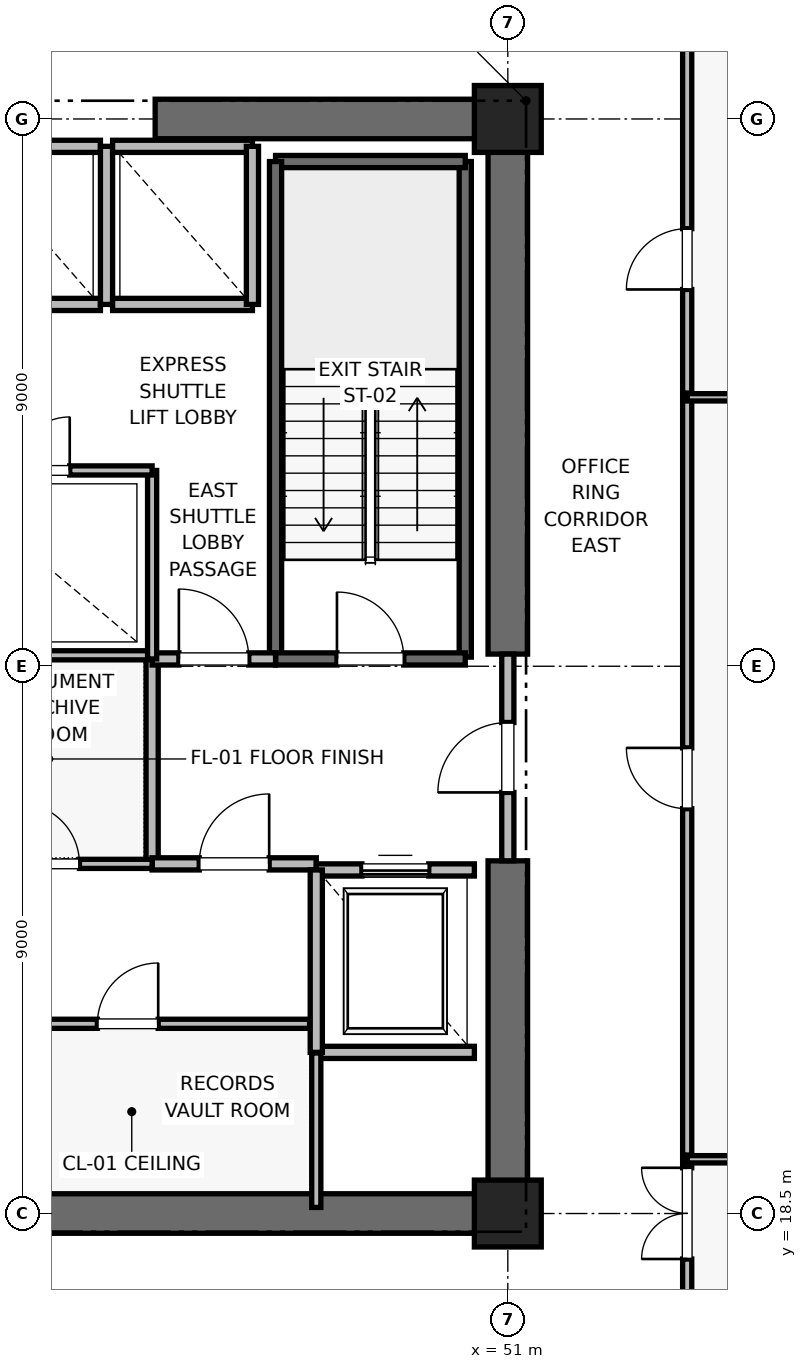
"""IFC4 building model, lengths in metres.
Left out: names, types, materials, properties, quantities, classifications, styles, units other than length and angle.
Written with IfcOpenShell. Run it as: python <this file> out.ifc"""

import sys

from ifc_helpers import new_model, si_unit, direction, frame, frame_2d, origin, origin_2d, place, context, subcontext, project, spatial, rectangle, extrude, element, fill, save


model = new_model("IFC4")
c1 = context("Model", 3, precision=1e-05, world=origin(), true_north=direction((0.0, 1.0)))
c2 = subcontext(c1, "Body", "Model", "MODEL_VIEW")
j1 = project(units=[si_unit("LENGTHUNIT", "METRE"), si_unit("PLANEANGLEUNIT", "RADIAN")], contexts=[c1])
p1 = place(None, origin())
s1 = spatial("IfcSite", under=j1, at=p1, CompositionType="ELEMENT")
p2 = place(p1, origin())
s2 = spatial("IfcBuilding", under=s1, at=p2, CompositionType="ELEMENT")
p3 = place(p2, frame((0.0, 0.0, 55.6)))
s3 = spatial("IfcBuildingStorey", under=s2, at=p3, CompositionType="ELEMENT", Elevation=55.6)
for number, where, z_axis, x_axis in (
    (1, (51.0, 18.5, 0.0), (0.0, 0.0, 1.0), (1.0, 0.0, 0.0)),
    (2, (51.0, 36.5, 0.0), (0.0, 0.0, 1.0), (1.0, 0.0, 0.0)),
):
    element("IfcColumn", number, at=place(p3, frame(where, z_axis=z_axis, x_axis=x_axis)), inside=s3, PredefinedType="PILASTER", context=c2, shape_type="SweptSolid", body=[
        extrude(rectangle(XDim=1.1, YDim=1.1, at=origin_2d()), origin(), (0.0, 0.0, 1.0), 4.0),
    ])
p4 = place(p3, frame((41.8, 18.5, 0.0), z_axis=(0.0, 0.0, 1.0), x_axis=(1.0, 0.0, 0.0)))
e3 = element("IfcWall", 3, at=p4, inside=s3, PredefinedType="SHEAR", context=c2, shape_type="SweptSolid", body=[
    extrude(rectangle(XDim=9.2, YDim=0.65, at=frame_2d((4.6, 0.0))), origin(), (0.0, 0.0, 1.0), 3.76),
])
for number, where, z_axis, x_axis in (
    (4, (45.2, 36.5, 0.0), (0.0, 0.0, 1.0), (1.0, 0.0, 0.0)),
    (5, (51.0, 18.5, 0.0), (0.0, 0.0, 1.0), (0.0, 1.0, 0.0)),
):
    element("IfcWall", number, at=place(p3, frame(where, z_axis=z_axis, x_axis=x_axis)), inside=s3, PredefinedType="SHEAR", context=c2, shape_type="SweptSolid", body=[
        extrude(rectangle(XDim=5.8, YDim=0.65, at=frame_2d((2.9, 0.0))), origin(), (0.0, 0.0, 1.0), 3.76),
    ])
p5 = place(p3, frame((51.0, 27.7, 0.0), z_axis=(0.0, 0.0, 1.0), x_axis=(0.0, 1.0, 0.0)))
e6 = element("IfcWall", 6, at=p5, inside=s3, PredefinedType="SHEAR", context=c2, shape_type="SweptSolid", body=[
    extrude(rectangle(XDim=8.8, YDim=0.65, at=frame_2d((4.4, 0.0))), origin(), (0.0, 0.0, 1.0), 3.76),
])
p6 = place(p3, frame((50.3, 27.65, 0.0), z_axis=(0.0, 0.0, 1.0), x_axis=(0.0, 1.0, 0.0)))
e7 = element("IfcWall", 7, at=p6, inside=s3, PredefinedType="SOLIDWALL", context=c2, shape_type="SweptSolid", body=[
    extrude(rectangle(XDim=8.15, YDim=0.2, at=frame_2d((4.075, 0.0))), origin(), (0.0, 0.0, 1.0), 3.76),
])
p7 = place(p3, frame((47.18, 35.8, 0.0), z_axis=(0.0, 0.0, 1.0), x_axis=(1.0, 0.0, 0.0)))
e8 = element("IfcWall", 8, at=p7, inside=s3, PredefinedType="SOLIDWALL", context=c2, shape_type="SweptSolid", body=[
    extrude(rectangle(XDim=3.12, YDim=0.2, at=frame_2d((1.56, 0.0))), origin(), (0.0, 0.0, 1.0), 3.76),
])
p8 = place(p3, frame((47.18, 27.62, 0.0), z_axis=(0.0, 0.0, 1.0), x_axis=(0.0, 1.0, 0.0)))
e9 = element("IfcWall", 9, at=p8, inside=s3, PredefinedType="SOLIDWALL", context=c2, shape_type="SweptSolid", body=[
    extrude(rectangle(XDim=8.18, YDim=0.2, at=frame_2d((4.09, 0.0))), origin(), (0.0, 0.0, 1.0), 3.76),
])
p9 = place(p3, frame((47.18, 27.62, 0.0), z_axis=(0.0, 0.0, 1.0), x_axis=(1.0, 0.0, 0.0)))
e10 = element("IfcWall", 10, at=p9, inside=s3, PredefinedType="SOLIDWALL", context=c2, shape_type="SweptSolid", body=[
    extrude(rectangle(XDim=3.12, YDim=0.2, at=frame_2d((1.56, 0.0))), origin(), (0.0, 0.0, 1.0), 3.76),
])
p10 = place(p9, frame((1.01, 0.0, 0.0)))
e11 = element("IfcOpeningElement", 11, at=p10, cuts=e10, PredefinedType="OPENING", context=c2, shape_type="SweptSolid", body=[
    extrude(rectangle(XDim=1.1, YDim=2.15, at=frame_2d((0.55, 1.075))), frame((0.0, 0.1, 0.0), z_axis=(0.0, -1.0, 0.0), x_axis=(1.0, 0.0, 0.0)), (0.0, 0.0, 1.0), 0.2),
])
p11 = place(p3, frame((45.15, 24.25, 0.0), z_axis=(0.0, 0.0, 1.0), x_axis=(0.0, 1.0, 0.0)))
e12 = element("IfcWall", 12, at=p11, inside=s3, PredefinedType="PARTITIONING", context=c2, shape_type="SweptSolid", body=[
    extrude(rectangle(XDim=3.37, YDim=0.2, at=frame_2d((1.685, 0.0))), origin(), (0.0, 0.0, 1.0), 3.76),
])
p12 = place(p3, frame((45.15, 24.25, 0.0), z_axis=(0.0, 0.0, 1.0), x_axis=(1.0, 0.0, 0.0)))
e13 = element("IfcWall", 13, at=p12, inside=s3, PredefinedType="PARTITIONING", context=c2, shape_type="SweptSolid", body=[
    extrude(rectangle(XDim=2.7, YDim=0.2, at=frame_2d((1.35, 0.0))), origin(), (0.0, 0.0, 1.0), 3.76),
])
p13 = place(p12, frame((0.775, 0.0, 0.0)))
e14 = element("IfcOpeningElement", 14, at=p13, cuts=e13, PredefinedType="OPENING", context=c2, shape_type="SweptSolid", body=[
    extrude(rectangle(XDim=1.15, YDim=2.2, at=frame_2d((0.575, 1.1))), frame((0.0, 0.1, 0.0), z_axis=(0.0, -1.0, 0.0), x_axis=(1.0, 0.0, 0.0)), (0.0, 0.0, 1.0), 0.2),
])
p14 = place(p3, frame((45.15, 27.62, 0.0), z_axis=(0.0, 0.0, 1.0), x_axis=(1.0, 0.0, 0.0)))
e15 = element("IfcWall", 15, at=p14, inside=s3, PredefinedType="PARTITIONING", context=c2, shape_type="SweptSolid", body=[
    extrude(rectangle(XDim=2.03, YDim=0.2, at=frame_2d((1.015, 0.0))), origin(), (0.0, 0.0, 1.0), 3.76),
])
p15 = place(p14, frame((0.44, 0.0, 0.0)))
e16 = element("IfcOpeningElement", 16, at=p15, cuts=e15, PredefinedType="OPENING", context=c2, shape_type="SweptSolid", body=[
    extrude(rectangle(XDim=1.15, YDim=2.2, at=frame_2d((0.575, 1.1))), frame((0.0, 0.1, 0.0), z_axis=(0.0, -1.0, 0.0), x_axis=(1.0, 0.0, 0.0)), (0.0, 0.0, 1.0), 0.2),
])
p16 = place(p3, frame((51.0, 24.3, 0.0), z_axis=(0.0, 0.0, 1.0), x_axis=(0.0, 1.0, 0.0)))
e17 = element("IfcWall", 17, at=p16, inside=s3, PredefinedType="PARTITIONING", context=c2, shape_type="SweptSolid", body=[
    extrude(rectangle(XDim=3.4, YDim=0.2, at=frame_2d((1.7, 0.0))), origin(), (0.0, 0.0, 1.0), 2.54),
])
p17 = place(p16, frame((1.125, 0.0, 0.0)))
e18 = element("IfcOpeningElement", 18, at=p17, cuts=e17, PredefinedType="OPENING", context=c2, shape_type="SweptSolid", body=[
    extrude(rectangle(XDim=1.15, YDim=2.2, at=frame_2d((0.575, 1.1))), frame((0.0, 0.1, 0.0), z_axis=(0.0, -1.0, 0.0), x_axis=(1.0, 0.0, 0.0)), (0.0, 0.0, 1.0), 0.2),
])
p18 = place(p3, frame((47.85, 21.15, 0.0), z_axis=(0.0, 0.0, 1.0), x_axis=(1.0, 0.0, 0.0)))
e19 = element("IfcWall", 19, at=p18, inside=s3, PredefinedType="SOLIDWALL", context=c2, shape_type="SweptSolid", body=[
    extrude(rectangle(XDim=2.6, YDim=0.2, at=frame_2d((1.3, 0.0))), origin(), (0.0, 0.0, 1.0), 3.76),
])
p19 = place(p3, frame((50.45, 24.15, 0.0), z_axis=(0.0, 0.0, 1.0), x_axis=(-1.0, 0.0, 0.0)))
e20 = element("IfcWall", 20, at=p19, inside=s3, PredefinedType="SOLIDWALL", context=c2, shape_type="SweptSolid", body=[
    extrude(rectangle(XDim=2.6, YDim=0.2, at=frame_2d((1.3, 0.0))), origin(), (0.0, 0.0, 1.0), 2.54),
])
p20 = place(p19, frame((0.75, 0.0, 0.0)))
e21 = element("IfcOpeningElement", 21, at=p20, cuts=e20, PredefinedType="OPENING", context=c2, shape_type="SweptSolid", body=[
    extrude(rectangle(XDim=1.1, YDim=2.2, at=frame_2d((0.55, 1.1))), frame((0.0, 0.1, 0.0), z_axis=(0.0, -1.0, 0.0), x_axis=(1.0, 0.0, 0.0)), (0.0, 0.0, 1.0), 0.2),
])
p21 = place(p3, frame((47.85, 24.15, 0.0), z_axis=(0.0, 0.0, 1.0), x_axis=(0.0, -1.0, 0.0)))
e22 = element("IfcWall", 22, at=p21, inside=s3, PredefinedType="SOLIDWALL", context=c2, shape_type="SweptSolid", body=[
    extrude(rectangle(XDim=3.0, YDim=0.2, at=frame_2d((1.5, 0.0))), origin(), (0.0, 0.0, 1.0), 3.76),
])
p22 = place(p3, frame((42.0, 33.45, 0.0), z_axis=(0.0, 0.0, 1.0), x_axis=(1.0, 0.0, 0.0)))
e23 = element("IfcWall", 23, at=p22, inside=s3, PredefinedType="SOLIDWALL", context=c2, shape_type="SweptSolid", body=[
    extrude(rectangle(XDim=2.3, YDim=0.2, at=frame_2d((1.15, 0.0))), origin(), (0.0, 0.0, 1.0), 3.76),
])
p23 = place(p3, frame((44.3, 36.05, 0.0), z_axis=(0.0, 0.0, 1.0), x_axis=(-1.0, 0.0, 0.0)))
e24 = element("IfcWall", 24, at=p23, inside=s3, PredefinedType="SOLIDWALL", context=c2, shape_type="SweptSolid", body=[
    extrude(rectangle(XDim=2.3, YDim=0.2, at=frame_2d((1.15, 0.0))), origin(), (0.0, 0.0, 1.0), 2.54),
])
p24 = place(p3, frame((44.4, 33.45, 0.0), z_axis=(0.0, 0.0, 1.0), x_axis=(0.0, 1.0, 0.0)))
e25 = element("IfcWall", 25, at=p24, inside=s3, PredefinedType="SOLIDWALL", context=c2, shape_type="SweptSolid", body=[
    extrude(rectangle(XDim=2.6, YDim=0.2, at=frame_2d((1.3, 0.0))), origin(), (0.0, 0.0, 1.0), 2.54),
])
p25 = place(p3, frame((44.5, 33.45, 0.0), z_axis=(0.0, 0.0, 1.0), x_axis=(1.0, 0.0, 0.0)))
e26 = element("IfcWall", 26, at=p25, inside=s3, PredefinedType="SOLIDWALL", context=c2, shape_type="SweptSolid", body=[
    extrude(rectangle(XDim=2.3, YDim=0.2, at=frame_2d((1.15, 0.0))), origin(), (0.0, 0.0, 1.0), 3.76),
])
p26 = place(p3, frame((46.8, 36.05, 0.0), z_axis=(0.0, 0.0, 1.0), x_axis=(-1.0, 0.0, 0.0)))
e27 = element("IfcWall", 27, at=p26, inside=s3, PredefinedType="SOLIDWALL", context=c2, shape_type="SweptSolid", body=[
    extrude(rectangle(XDim=2.3, YDim=0.2, at=frame_2d((1.15, 0.0))), origin(), (0.0, 0.0, 1.0), 2.54),
])
p27 = place(p3, frame((46.8, 33.45, 0.0), z_axis=(0.0, 0.0, 1.0), x_axis=(0.0, 1.0, 0.0)))
e28 = element("IfcWall", 28, at=p27, inside=s3, PredefinedType="SOLIDWALL", context=c2, shape_type="SweptSolid", body=[
    extrude(rectangle(XDim=2.6, YDim=0.2, at=frame_2d((1.3, 0.0))), origin(), (0.0, 0.0, 1.0), 3.76),
])
p28 = place(p3, frame((41.56, 27.68, 0.0), z_axis=(0.0, 0.0, 1.0), x_axis=(1.0, 0.0, 0.0)))
e29 = element("IfcWall", 29, at=p28, inside=s3, PredefinedType="PARTITIONING", context=c2, shape_type="SweptSolid", body=[
    extrude(rectangle(XDim=3.59, YDim=0.15, at=frame_2d((1.795, 0.0))), origin(), (0.0, 0.0, 1.0), 2.85),
])
p29 = place(p3, frame((47.85, 18.6, 0.0), z_axis=(0.0, 0.0, 1.0), x_axis=(0.0, 1.0, 0.0)))
e30 = element("IfcWall", 30, at=p29, inside=s3, PredefinedType="PARTITIONING", context=c2, shape_type="SweptSolid", body=[
    extrude(rectangle(XDim=2.54, YDim=0.15, at=frame_2d((1.27, 0.0))), origin(), (0.0, 0.0, 1.0), 2.85),
])
p30 = place(p3, frame((41.76, 21.62, 0.0), z_axis=(0.0, 0.0, 1.0), x_axis=(1.0, 0.0, 0.0)))
e31 = element("IfcWall", 31, at=p30, inside=s3, PredefinedType="PARTITIONING", context=c2, shape_type="SweptSolid", body=[
    extrude(rectangle(XDim=5.98, YDim=0.15, at=frame_2d((2.99, 0.0))), origin(), (0.0, 0.0, 1.0), 2.85),
])
p31 = place(p30, frame((2.49, 0.0, 0.0)))
e32 = element("IfcOpeningElement", 32, at=p31, cuts=e31, PredefinedType="OPENING", context=c2, shape_type="SweptSolid", body=[
    extrude(rectangle(XDim=1.0, YDim=2.15, at=frame_2d((0.5, 1.075))), frame((0.0, 0.075, 0.0), z_axis=(0.0, -1.0, 0.0), x_axis=(1.0, 0.0, 0.0)), (0.0, 0.0, 1.0), 0.15),
])
p32 = place(p3, frame((41.76, 24.25, 0.0), z_axis=(0.0, 0.0, 1.0), x_axis=(1.0, 0.0, 0.0)))
e33 = element("IfcWall", 33, at=p32, inside=s3, PredefinedType="PARTITIONING", context=c2, shape_type="SweptSolid", body=[
    extrude(rectangle(XDim=3.39, YDim=0.15, at=frame_2d((1.695, 0.0))), origin(), (0.0, 0.0, 1.0), 2.85),
])
p33 = place(p32, frame((1.195, 0.0, 0.0)))
e34 = element("IfcOpeningElement", 34, at=p33, cuts=e33, PredefinedType="OPENING", context=c2, shape_type="SweptSolid", body=[
    extrude(rectangle(XDim=1.0, YDim=2.15, at=frame_2d((0.5, 1.075))), frame((0.0, 0.075, 0.0), z_axis=(0.0, -1.0, 0.0), x_axis=(1.0, 0.0, 0.0)), (0.0, 0.0, 1.0), 0.15),
])
p34 = place(p3, frame((45.15, 27.62, 0.0), z_axis=(0.0, 0.0, 1.0), x_axis=(0.0, 1.0, 0.0)))
e35 = element("IfcWall", 35, at=p34, inside=s3, PredefinedType="PARTITIONING", context=c2, shape_type="SweptSolid", body=[
    extrude(rectangle(XDim=3.1, YDim=0.15, at=frame_2d((1.55, 0.0))), origin(), (0.0, 0.0, 1.0), 2.85),
])
p35 = place(p3, frame((41.56, 30.72, 0.0), z_axis=(0.0, 0.0, 1.0), x_axis=(1.0, 0.0, 0.0)))
e36 = element("IfcWall", 36, at=p35, inside=s3, PredefinedType="PARTITIONING", context=c2, shape_type="SweptSolid", body=[
    extrude(rectangle(XDim=3.59, YDim=0.15, at=frame_2d((1.795, 0.0))), origin(), (0.0, 0.0, 1.0), 2.85),
])
p36 = place(p35, frame((1.355, 0.0, 0.0)))
e37 = element("IfcOpeningElement", 37, at=p36, cuts=e36, PredefinedType="OPENING", context=c2, shape_type="SweptSolid", body=[
    extrude(rectangle(XDim=0.88, YDim=2.1, at=frame_2d((0.44, 1.05))), frame((0.0, 0.075, 0.0), z_axis=(0.0, -1.0, 0.0), x_axis=(1.0, 0.0, 0.0)), (0.0, 0.0, 1.0), 0.15),
])
p37 = place(p3, frame((53.95, 9.073, 0.0), z_axis=(0.0, 0.0, 1.0), x_axis=(0.0, 1.0, 0.0)))
e38 = element("IfcWall", 38, at=p37, inside=s3, PredefinedType="PARTITIONING", context=c2, shape_type="SweptSolid", body=[
    extrude(rectangle(XDim=10.319, YDim=0.15, at=frame_2d((5.16, 0.0))), origin(), (0.0, 0.0, 1.0), 2.85),
])
p38 = place(p37, frame((8.679, 0.0, 0.0)))
e39 = element("IfcOpeningElement", 39, at=p38, cuts=e38, PredefinedType="OPENING", context=c2, shape_type="SweptSolid", body=[
    extrude(rectangle(XDim=1.5, YDim=2.25, at=frame_2d((0.75, 1.125))), frame((0.0, 0.075, 0.0), z_axis=(0.0, -1.0, 0.0), x_axis=(1.0, 0.0, 0.0)), (0.0, 0.0, 1.0), 0.15),
])
p39 = place(p3, frame((53.95, 19.392, 0.0), z_axis=(0.0, 0.0, 1.0), x_axis=(1.0, 0.0, 0.0)))
e40 = element("IfcWall", 40, at=p39, inside=s3, PredefinedType="PARTITIONING", context=c2, shape_type="SweptSolid", body=[
    extrude(rectangle(XDim=11.646, YDim=0.12, at=frame_2d((5.823, 0.0))), origin(), (0.0, 0.0, 1.0), 2.85),
])
p40 = place(p3, frame((53.95, 19.462, 0.0), z_axis=(0.0, 0.0, 1.0), x_axis=(0.0, 1.0, 0.0)))
e41 = element("IfcWall", 41, at=p40, inside=s3, PredefinedType="PARTITIONING", context=c2, shape_type="SweptSolid", body=[
    extrude(rectangle(XDim=12.461, YDim=0.15, at=frame_2d((6.23, 0.0))), origin(), (0.0, 0.0, 1.0), 2.85),
])
p41 = place(p40, frame((5.695, 0.0, 0.0)))
e42 = element("IfcOpeningElement", 42, at=p41, cuts=e41, PredefinedType="OPENING", context=c2, shape_type="SweptSolid", body=[
    extrude(rectangle(XDim=1.0, YDim=2.15, at=frame_2d((0.5, 1.075))), frame((0.0, 0.075, 0.0), z_axis=(0.0, -1.0, 0.0), x_axis=(1.0, 0.0, 0.0)), (0.0, 0.0, 1.0), 0.15),
])
p42 = place(p3, frame((53.95, 31.923, 0.0), z_axis=(0.0, 0.0, 1.0), x_axis=(1.0, 0.0, 0.0)))
e43 = element("IfcWall", 43, at=p42, inside=s3, PredefinedType="PARTITIONING", context=c2, shape_type="SweptSolid", body=[
    extrude(rectangle(XDim=11.646, YDim=0.12, at=frame_2d((5.823, 0.0))), origin(), (0.0, 0.0, 1.0), 2.85),
])
p43 = place(p3, frame((53.95, 31.992, 0.0), z_axis=(0.0, 0.0, 1.0), x_axis=(0.0, 1.0, 0.0)))
e44 = element("IfcWall", 44, at=p43, inside=s3, PredefinedType="PARTITIONING", context=c2, shape_type="SweptSolid", body=[
    extrude(rectangle(XDim=13.935, YDim=0.15, at=frame_2d((6.967, 0.0))), origin(), (0.0, 0.0, 1.0), 2.85),
])
p44 = place(p43, frame((1.704, 0.0, 0.0)))
e45 = element("IfcOpeningElement", 45, at=p44, cuts=e44, PredefinedType="OPENING", context=c2, shape_type="SweptSolid", body=[
    extrude(rectangle(XDim=1.0, YDim=2.15, at=frame_2d((0.5, 1.075))), frame((0.0, 0.075, 0.0), z_axis=(0.0, -1.0, 0.0), x_axis=(1.0, 0.0, 0.0)), (0.0, 0.0, 1.0), 0.15),
])
p45 = place(p10, origin())
e46 = element("IfcDoor", 46, at=p45, inside=s3, OperationType="SINGLE_SWING_LEFT", PredefinedType="DOOR", context=c2, shape_type="SweptSolid", body=[
    extrude(rectangle(XDim=1.1, YDim=2.15, at=frame_2d((0.55, 1.075))), frame((0.0, 0.025, 0.0), z_axis=(0.0, -1.0, 0.0), x_axis=(1.0, 0.0, 0.0)), (0.0, 0.0, 1.0), 0.05),
])
fill(e11, e46)
p46 = place(p13, origin())
e47 = element("IfcDoor", 47, at=p46, inside=s3, OperationType="SINGLE_SWING_RIGHT", PredefinedType="DOOR", context=c2, shape_type="SweptSolid", body=[
    extrude(rectangle(XDim=1.15, YDim=2.2, at=frame_2d((0.575, 1.1))), frame((0.0, 0.025, 0.0), z_axis=(0.0, -1.0, 0.0), x_axis=(1.0, 0.0, 0.0)), (0.0, 0.0, 1.0), 0.05),
])
fill(e14, e47)
p47 = place(p15, origin())
e48 = element("IfcDoor", 48, at=p47, inside=s3, OperationType="SINGLE_SWING_LEFT", PredefinedType="DOOR", context=c2, shape_type="SweptSolid", body=[
    extrude(rectangle(XDim=1.15, YDim=2.2, at=frame_2d((0.575, 1.1))), frame((0.0, 0.025, 0.0), z_axis=(0.0, -1.0, 0.0), x_axis=(1.0, 0.0, 0.0)), (0.0, 0.0, 1.0), 0.05),
])
fill(e16, e48)
p48 = place(p17, origin())
e49 = element("IfcDoor", 49, at=p48, inside=s3, OperationType="SINGLE_SWING_LEFT", PredefinedType="DOOR", context=c2, shape_type="SweptSolid", body=[
    extrude(rectangle(XDim=1.15, YDim=2.2, at=frame_2d((0.575, 1.1))), frame((0.0, 0.025, 0.0), z_axis=(0.0, -1.0, 0.0), x_axis=(1.0, 0.0, 0.0)), (0.0, 0.0, 1.0), 0.05),
])
fill(e18, e49)
p49 = place(p20, origin())
e50 = element("IfcDoor", 50, at=p49, inside=s3, OperationType="SLIDING_TO_RIGHT", PredefinedType="DOOR", context=c2, shape_type="SweptSolid", body=[
    extrude(rectangle(XDim=1.1, YDim=2.2, at=frame_2d((0.55, 1.1))), frame((0.0, 0.025, 0.0), z_axis=(0.0, -1.0, 0.0), x_axis=(1.0, 0.0, 0.0)), (0.0, 0.0, 1.0), 0.05),
])
fill(e21, e50)
p50 = place(p31, origin())
e51 = element("IfcDoor", 51, at=p50, inside=s3, OperationType="SINGLE_SWING_RIGHT", PredefinedType="DOOR", context=c2, shape_type="SweptSolid", body=[
    extrude(rectangle(XDim=1.0, YDim=2.15, at=frame_2d((0.5, 1.075))), frame((0.0, 0.025, 0.0), z_axis=(0.0, -1.0, 0.0), x_axis=(1.0, 0.0, 0.0)), (0.0, 0.0, 1.0), 0.05),
])
fill(e32, e51)
p51 = place(p33, origin())
e52 = element("IfcDoor", 52, at=p51, inside=s3, OperationType="SINGLE_SWING_LEFT", PredefinedType="DOOR", context=c2, shape_type="SweptSolid", body=[
    extrude(rectangle(XDim=1.0, YDim=2.15, at=frame_2d((0.5, 1.075))), frame((0.0, 0.025, 0.0), z_axis=(0.0, -1.0, 0.0), x_axis=(1.0, 0.0, 0.0)), (0.0, 0.0, 1.0), 0.05),
])
fill(e34, e52)
p52 = place(p36, origin())
e53 = element("IfcDoor", 53, at=p52, inside=s3, OperationType="SINGLE_SWING_RIGHT", PredefinedType="DOOR", context=c2, shape_type="SweptSolid", body=[
    extrude(rectangle(XDim=0.88, YDim=2.1, at=frame_2d((0.44, 1.05))), frame((0.0, 0.025, 0.0), z_axis=(0.0, -1.0, 0.0), x_axis=(1.0, 0.0, 0.0)), (0.0, 0.0, 1.0), 0.05),
])
fill(e37, e53)
p53 = place(p38, origin())
e54 = element("IfcDoor", 54, at=p53, inside=s3, OperationType="DOUBLE_DOOR_SINGLE_SWING", PredefinedType="DOOR", context=c2, shape_type="SweptSolid", body=[
    extrude(rectangle(XDim=1.5, YDim=2.25, at=frame_2d((0.75, 1.125))), frame((0.0, 0.025, 0.0), z_axis=(0.0, -1.0, 0.0), x_axis=(1.0, 0.0, 0.0)), (0.0, 0.0, 1.0), 0.05),
])
fill(e39, e54)
p54 = place(p41, origin())
e55 = element("IfcDoor", 55, at=p54, inside=s3, OperationType="SINGLE_SWING_RIGHT", PredefinedType="DOOR", context=c2, shape_type="SweptSolid", body=[
    extrude(rectangle(XDim=1.0, YDim=2.15, at=frame_2d((0.5, 1.075))), frame((0.0, 0.025, 0.0), z_axis=(0.0, -1.0, 0.0), x_axis=(1.0, 0.0, 0.0)), (0.0, 0.0, 1.0), 0.05),
])
fill(e42, e55)
p55 = place(p44, origin())
e56 = element("IfcDoor", 56, at=p55, inside=s3, OperationType="SINGLE_SWING_LEFT", PredefinedType="DOOR", context=c2, shape_type="SweptSolid", body=[
    extrude(rectangle(XDim=1.0, YDim=2.15, at=frame_2d((0.5, 1.075))), frame((0.0, 0.025, 0.0), z_axis=(0.0, -1.0, 0.0), x_axis=(1.0, 0.0, 0.0)), (0.0, 0.0, 1.0), 0.05),
])
fill(e45, e56)
save(model, sys.argv[1])
